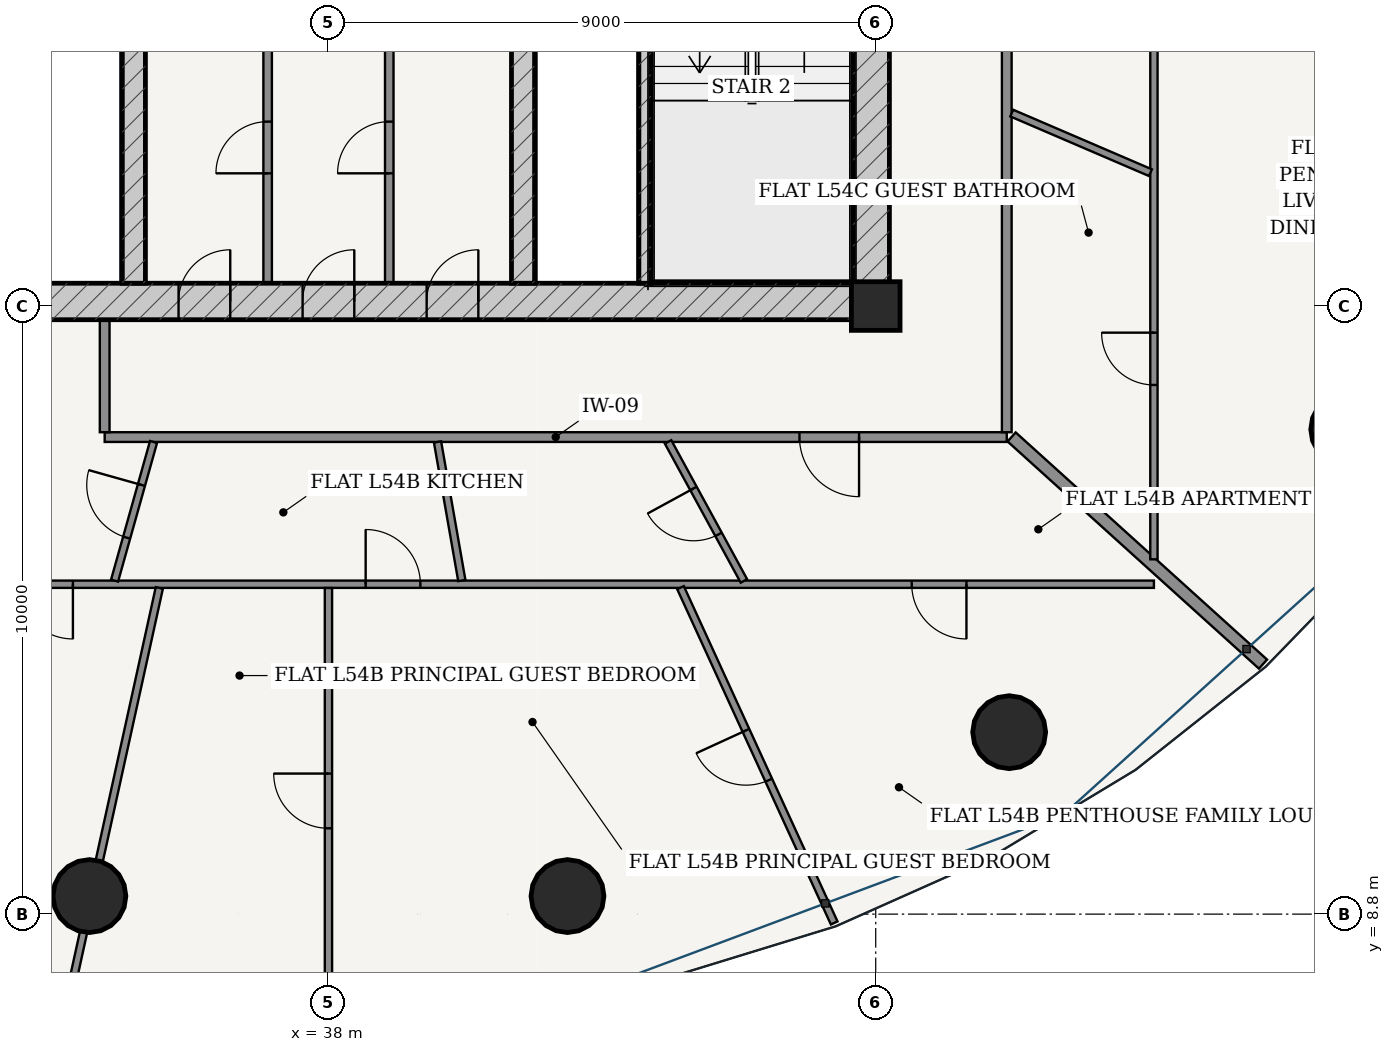
"""IFC4 building model, lengths in metres.
Left out: names, types, materials, properties, quantities, classifications, styles, units other than length and angle.
Written with IfcOpenShell. Run it as: python <this file> out.ifc"""

import sys

from ifc_helpers import new_model, si_unit, direction, frame, frame_2d, origin, origin_2d, place, context, subcontext, project, spatial, rectangle, hollow_circle, extrude, source, transform, mapped, element, fill, save


model = new_model("IFC4")
c1 = context("Model", 3, precision=1e-05, world=origin(), true_north=direction((-0.2419218956, 0.970295726276)))
c2 = subcontext(c1, "Body", "Model", "MODEL_VIEW")
j1 = project(units=[si_unit("LENGTHUNIT", "METRE"), si_unit("PLANEANGLEUNIT", "RADIAN")], contexts=[c1])
p1 = place(None, origin())
s1 = spatial("IfcSite", under=j1, at=p1, CompositionType="ELEMENT")
p2 = place(p1, origin())
s2 = spatial("IfcBuilding", under=s1, at=p2, CompositionType="ELEMENT")
p3 = place(p2, frame((0.0, 0.0, 206.0)))
s3 = spatial("IfcBuildingStorey", under=s2, at=p3, CompositionType="ELEMENT", Elevation=206.0)
p4 = place(p3, frame((47.0, 18.8, 0.0), z_axis=(0.0, 0.0, 1.0), x_axis=(1.0, 0.0, 0.0)))
e1 = element("IfcColumn", 1, at=p4, inside=s3, PredefinedType="COLUMN", context=c2, shape_type="SweptSolid", body=[
    extrude(rectangle(XDim=0.8, YDim=0.8, at=origin_2d()), origin(), (0.0, 0.0, 1.0), 3.7),
])
p5 = place(p3, frame((28.775, 18.875, 0.0), z_axis=(0.0, 0.0, 1.0), x_axis=(1.0, 0.0, 0.0)))
e2 = element("IfcWall", 2, at=p5, inside=s3, PredefinedType="SHEAR", context=c2, shape_type="SweptSolid", body=[
    extrude(rectangle(XDim=18.45, YDim=0.6, at=frame_2d((9.225, 0.0))), origin(), (0.0, 0.0, 1.0), 3.435),
])
p6 = place(p5, frame((6.76, 0.0, 0.0)))
e3 = element("IfcOpeningElement", 3, at=p6, cuts=e2, PredefinedType="OPENING", context=c2, shape_type="SweptSolid", body=[
    extrude(rectangle(XDim=0.85, YDim=2.1, at=frame_2d((0.425, 1.05))), frame((0.0, 0.31, 0.0), z_axis=(0.0, -1.0, 0.0), x_axis=(1.0, 0.0, 0.0)), (0.0, 0.0, 1.0), 0.62),
])
p7 = place(p5, frame((8.8, 0.0, 0.0)))
e4 = element("IfcOpeningElement", 4, at=p7, cuts=e2, PredefinedType="OPENING", context=c2, shape_type="SweptSolid", body=[
    extrude(rectangle(XDim=0.85, YDim=2.1, at=frame_2d((0.425, 1.05))), frame((0.0, 0.31, 0.0), z_axis=(0.0, -1.0, 0.0), x_axis=(1.0, 0.0, 0.0)), (0.0, 0.0, 1.0), 0.62),
])
p8 = place(p5, frame((10.84, 0.0, 0.0)))
e5 = element("IfcOpeningElement", 5, at=p8, cuts=e2, PredefinedType="OPENING", context=c2, shape_type="SweptSolid", body=[
    extrude(rectangle(XDim=0.85, YDim=2.1, at=frame_2d((0.425, 1.05))), frame((0.0, 0.31, 0.0), z_axis=(0.0, -1.0, 0.0), x_axis=(1.0, 0.0, 0.0)), (0.0, 0.0, 1.0), 0.62),
])
p9 = place(p3, frame((46.925, 19.175, 0.0), z_axis=(0.0, 0.0, 1.0), x_axis=(0.0, 1.0, 0.0)))
e6 = element("IfcWall", 6, at=p9, inside=s3, PredefinedType="SHEAR", context=c2, shape_type="SweptSolid", body=[
    extrude(rectangle(XDim=15.25, YDim=0.6, at=frame_2d((7.625, 0.0))), origin(), (0.0, 0.0, 1.0), 3.435),
])
p10 = place(p9, frame((9.875, 0.0, 0.0)))
e7 = element("IfcOpeningElement", 7, at=p10, cuts=e6, PredefinedType="OPENING", context=c2, shape_type="SweptSolid", body=[
    extrude(rectangle(XDim=1.5, YDim=2.2, at=frame_2d((0.75, 1.1))), frame((0.0, 0.31, 0.0), z_axis=(0.0, -1.0, 0.0), x_axis=(1.0, 0.0, 0.0)), (0.0, 0.0, 1.0), 0.62),
])
p11 = place(p3, frame((43.205, 19.175, 0.0), z_axis=(0.0, 0.0, 1.0), x_axis=(0.0, 1.0, 0.0)))
e8 = element("IfcWall", 8, at=p11, inside=s3, PredefinedType="SOLIDWALL", context=c2, shape_type="SweptSolid", body=[
    extrude(rectangle(XDim=7.375, YDim=0.2, at=frame_2d((3.688, 0.0))), origin(), (0.0, 0.0, 1.0), 3.435),
])
p12 = place(p3, frame((34.8, 19.175, 0.0), z_axis=(0.0, 0.0, 1.0), x_axis=(0.0, 1.0, 0.0)))
e9 = element("IfcWall", 9, at=p12, inside=s3, PredefinedType="SHEAR", context=c2, shape_type="SweptSolid", body=[
    extrude(rectangle(XDim=15.25, YDim=0.38, at=frame_2d((7.625, 0.0))), origin(), (0.0, 0.0, 1.0), 3.435),
])
p13 = place(p12, frame((7.8, 0.0, 0.0)))
e10 = element("IfcOpeningElement", 10, at=p13, cuts=e9, PredefinedType="OPENING", context=c2, shape_type="SweptSolid", body=[
    extrude(rectangle(XDim=1.05, YDim=2.15, at=frame_2d((0.525, 1.075))), frame((0.0, 0.2, 0.0), z_axis=(0.0, -1.0, 0.0), x_axis=(1.0, 0.0, 0.0)), (0.0, 0.0, 1.0), 0.4),
])
p14 = place(p3, frame((41.2, 19.175, 0.0), z_axis=(0.0, 0.0, 1.0), x_axis=(0.0, 1.0, 0.0)))
e11 = element("IfcWall", 11, at=p14, inside=s3, PredefinedType="SHEAR", context=c2, shape_type="SweptSolid", body=[
    extrude(rectangle(XDim=15.25, YDim=0.38, at=frame_2d((7.625, 0.0))), origin(), (0.0, 0.0, 1.0), 3.435),
])
p15 = place(p14, frame((7.8, 0.0, 0.0)))
e12 = element("IfcOpeningElement", 12, at=p15, cuts=e11, PredefinedType="OPENING", context=c2, shape_type="SweptSolid", body=[
    extrude(rectangle(XDim=1.05, YDim=2.15, at=frame_2d((0.525, 1.075))), frame((0.0, 0.2, 0.0), z_axis=(0.0, -1.0, 0.0), x_axis=(1.0, 0.0, 0.0)), (0.0, 0.0, 1.0), 0.4),
])
for number, where, z_axis, x_axis in (
    (13, (34.069, 9.097, 0.0), (0.0, 0.0, 1.0), (1.0, 0.0, 0.0)),
    (14, (41.931, 9.097, 0.0), (0.0, 0.0, 1.0), (1.0, 0.0, 0.0)),
    (15, (49.195, 11.792, 0.0), (0.0, 0.0, 1.0), (1.0, 0.0, 0.0)),
    (16, (54.754, 16.772, 0.0), (0.0, 0.0, 1.0), (1.0, 0.0, 0.0)),
):
    element("IfcColumn", number, at=place(p3, frame(where, z_axis=z_axis, x_axis=x_axis)), inside=s3, PredefinedType="COLUMN", context=c2, shape_type="SweptSolid", body=[
        extrude(hollow_circle(Radius=0.6, WallThickness=0.038, at=origin_2d()), origin(), (0.0, 0.0, 1.0), 3.7),
    ])
p16 = place(p3, frame((25.83, 10.473, 0.0), z_axis=(0.0, 0.0, 1.0), x_axis=(0.936556918375, -0.350515532672, 0.0)))
e17 = element("IfcWall", 17, at=p16, inside=s3, PredefinedType="SOLIDWALL", context=c2, shape_type="SweptSolid", body=[
    extrude(rectangle(XDim=8.539, YDim=0.26, at=frame_2d((4.27, 0.0))), origin(), (0.0, 0.0, 1.0), 3.435),
])
p17 = place(p16, frame((3.594, 0.0, 0.0)))
e18 = element("IfcOpeningElement", 18, at=p17, cuts=e17, PredefinedType="OPENING", context=c2, shape_type="SweptSolid", body=[
    extrude(rectangle(XDim=1.35, YDim=2.2, at=frame_2d((0.675, 1.1))), frame((0.0, 0.14, 0.0), z_axis=(0.0, -1.0, 0.0), x_axis=(1.0, 0.0, 0.0)), (0.0, 0.0, 1.0), 0.28),
])
p18 = place(p3, frame((37.0, 19.175, 0.0), z_axis=(0.0, 0.0, 1.0), x_axis=(0.0, 1.0, 0.0)))
e19 = element("IfcWall", 19, at=p18, inside=s3, PredefinedType="PARTITIONING", context=c2, shape_type="SweptSolid", body=[
    extrude(rectangle(XDim=4.465, YDim=0.14, at=frame_2d((2.232, 0.0))), origin(), (0.0, 0.0, 1.0), 3.435),
])
p19 = place(p18, frame((1.808, 0.0, 0.0)))
e20 = element("IfcOpeningElement", 20, at=p19, cuts=e19, PredefinedType="OPENING", context=c2, shape_type="SweptSolid", body=[
    extrude(rectangle(XDim=0.85, YDim=2.1, at=frame_2d((0.425, 1.05))), frame((0.0, 0.08, 0.0), z_axis=(0.0, -1.0, 0.0), x_axis=(1.0, 0.0, 0.0)), (0.0, 0.0, 1.0), 0.16),
])
p20 = place(p3, frame((39.0, 19.175, 0.0), z_axis=(0.0, 0.0, 1.0), x_axis=(0.0, 1.0, 0.0)))
e21 = element("IfcWall", 21, at=p20, inside=s3, PredefinedType="PARTITIONING", context=c2, shape_type="SweptSolid", body=[
    extrude(rectangle(XDim=4.465, YDim=0.14, at=frame_2d((2.232, 0.0))), origin(), (0.0, 0.0, 1.0), 3.435),
])
p21 = place(p20, frame((1.808, 0.0, 0.0)))
e22 = element("IfcOpeningElement", 22, at=p21, cuts=e21, PredefinedType="OPENING", context=c2, shape_type="SweptSolid", body=[
    extrude(rectangle(XDim=0.85, YDim=2.1, at=frame_2d((0.425, 1.05))), frame((0.0, 0.08, 0.0), z_axis=(0.0, -1.0, 0.0), x_axis=(1.0, 0.0, 0.0)), (0.0, 0.0, 1.0), 0.16),
])
p22 = place(p3, frame((34.32, 16.645, 0.0), z_axis=(0.0, 0.0, 1.0), x_axis=(1.0, 0.0, 0.0)))
e23 = element("IfcWall", 23, at=p22, inside=s3, PredefinedType="PARTITIONING", context=c2, shape_type="SweptSolid", body=[
    extrude(rectangle(XDim=14.835, YDim=0.16, at=frame_2d((7.417, 0.0))), origin(), (0.0, 0.0, 1.0), 2.951),
])
p23 = place(p22, frame((11.426, 0.0, 0.0)))
e24 = element("IfcOpeningElement", 24, at=p23, cuts=e23, PredefinedType="OPENING", context=c2, shape_type="SweptSolid", body=[
    extrude(rectangle(XDim=0.98, YDim=2.2, at=frame_2d((0.49, 1.1))), frame((0.0, 0.09, 0.0), z_axis=(0.0, -1.0, 0.0), x_axis=(1.0, 0.0, 0.0)), (0.0, 0.0, 1.0), 0.18),
])
p24 = place(p3, frame((34.32, 16.725, 0.0), z_axis=(0.0, 0.0, 1.0), x_axis=(0.0, 1.0, 0.0)))
e25 = element("IfcWall", 25, at=p24, inside=s3, PredefinedType="PARTITIONING", context=c2, shape_type="SweptSolid", body=[
    extrude(rectangle(XDim=1.85, YDim=0.16, at=frame_2d((0.925, 0.0))), origin(), (0.0, 0.0, 1.0), 3.435),
])
p25 = place(p3, frame((49.155, 16.725, 0.0), z_axis=(0.0, 0.0, 1.0), x_axis=(0.0, 1.0, 0.0)))
e26 = element("IfcWall", 26, at=p25, inside=s3, PredefinedType="PARTITIONING", context=c2, shape_type="SweptSolid", body=[
    extrude(rectangle(XDim=18.3, YDim=0.16, at=frame_2d((9.15, 0.0))), origin(), (0.0, 0.0, 1.0), 2.951),
])
p26 = place(p25, frame((15.302, 0.0, 0.0)))
e27 = element("IfcOpeningElement", 27, at=p26, cuts=e26, PredefinedType="OPENING", context=c2, shape_type="SweptSolid", body=[
    extrude(rectangle(XDim=0.98, YDim=2.2, at=frame_2d((0.49, 1.1))), frame((0.0, 0.09, 0.0), z_axis=(0.0, -1.0, 0.0), x_axis=(1.0, 0.0, 0.0)), (0.0, 0.0, 1.0), 0.18),
])
p27 = place(p3, frame((51.575, 14.225, 0.0), z_axis=(0.0, 0.0, 1.0), x_axis=(-1.0, 0.0, 0.0)))
e28 = element("IfcWall", 28, at=p27, inside=s3, PredefinedType="PARTITIONING", context=c2, shape_type="SweptSolid", body=[
    extrude(rectangle(XDim=19.675, YDim=0.12, at=frame_2d((9.837, 0.0))), origin(), (0.0, 0.0, 1.0), 2.951),
])
p28 = place(p27, frame((3.083, 0.0, 0.0)))
e29 = element("IfcOpeningElement", 29, at=p28, cuts=e28, PredefinedType="OPENING", context=c2, shape_type="SweptSolid", body=[
    extrude(rectangle(XDim=0.9, YDim=2.15, at=frame_2d((0.45, 1.075))), frame((0.0, 0.07, 0.0), z_axis=(0.0, -1.0, 0.0), x_axis=(1.0, 0.0, 0.0)), (0.0, 0.0, 1.0), 0.14),
])
p29 = place(p27, frame((12.063, 0.0, 0.0)))
e30 = element("IfcOpeningElement", 30, at=p29, cuts=e28, PredefinedType="OPENING", context=c2, shape_type="SweptSolid", body=[
    extrude(rectangle(XDim=0.9, YDim=2.15, at=frame_2d((0.45, 1.075))), frame((0.0, 0.07, 0.0), z_axis=(0.0, -1.0, 0.0), x_axis=(1.0, 0.0, 0.0)), (0.0, 0.0, 1.0), 0.14),
])
p30 = place(p27, frame((17.777, 0.0, 0.0)))
e31 = element("IfcOpeningElement", 31, at=p30, cuts=e28, PredefinedType="OPENING", context=c2, shape_type="SweptSolid", body=[
    extrude(rectangle(XDim=0.9, YDim=2.15, at=frame_2d((0.45, 1.075))), frame((0.0, 0.07, 0.0), z_axis=(0.0, -1.0, 0.0), x_axis=(1.0, 0.0, 0.0)), (0.0, 0.0, 1.0), 0.14),
])
p31 = place(p3, frame((35.219, 14.165, 0.0), z_axis=(0.0, 0.0, 1.0), x_axis=(-0.214959845337, -0.976622887758, 0.0)))
e32 = element("IfcWall", 32, at=p31, inside=s3, PredefinedType="PARTITIONING", context=c2, shape_type="SweptSolid", body=[
    extrude(rectangle(XDim=6.744, YDim=0.12, at=frame_2d((3.372, 0.0))), origin(), (0.0, 0.0, 1.0), 2.951),
])
p32 = place(p3, frame((38.0, 14.163, 0.0), z_axis=(0.0, 0.0, 1.0), x_axis=(0.0, -1.0, 0.0)))
e33 = element("IfcWall", 33, at=p32, inside=s3, PredefinedType="PARTITIONING", context=c2, shape_type="SweptSolid", body=[
    extrude(rectangle(XDim=7.003, YDim=0.12, at=frame_2d((3.501, 0.0))), origin(), (0.0, 0.0, 1.0), 2.951),
])
p33 = place(p32, frame((3.052, 0.0, 0.0)))
e34 = element("IfcOpeningElement", 34, at=p33, cuts=e33, PredefinedType="OPENING", context=c2, shape_type="SweptSolid", body=[
    extrude(rectangle(XDim=0.9, YDim=2.15, at=frame_2d((0.45, 1.075))), frame((0.0, 0.07, 0.0), z_axis=(0.0, -1.0, 0.0), x_axis=(1.0, 0.0, 0.0)), (0.0, 0.0, 1.0), 0.14),
])
p34 = place(p3, frame((43.79, 14.169, 0.0), z_axis=(0.0, 0.0, 1.0), x_axis=(0.416687974363, -0.909049576218, 0.0)))
e35 = element("IfcWall", 35, at=p34, inside=s3, PredefinedType="PARTITIONING", context=c2, shape_type="SweptSolid", body=[
    extrude(rectangle(XDim=6.065, YDim=0.12, at=frame_2d((3.033, 0.0))), origin(), (0.0, 0.0, 1.0), 2.951),
])
p35 = place(p34, frame((2.583, 0.0, 0.0)))
e36 = element("IfcOpeningElement", 36, at=p35, cuts=e35, PredefinedType="OPENING", context=c2, shape_type="SweptSolid", body=[
    extrude(rectangle(XDim=0.9, YDim=2.15, at=frame_2d((0.45, 1.075))), frame((0.0, 0.07, 0.0), z_axis=(0.0, -1.0, 0.0), x_axis=(1.0, 0.0, 0.0)), (0.0, 0.0, 1.0), 0.14),
])
p36 = place(p3, frame((35.124, 16.565, 0.0), z_axis=(0.0, 0.0, 1.0), x_axis=(-0.270566477163, -0.962701293982, 0.0)))
e37 = element("IfcWall", 37, at=p36, inside=s3, PredefinedType="PARTITIONING", context=c2, shape_type="SweptSolid", body=[
    extrude(rectangle(XDim=2.369, YDim=0.12, at=frame_2d((1.184, 0.0))), origin(), (0.0, 0.0, 1.0), 3.435),
])
p37 = place(p36, frame((0.734, 0.0, 0.0)))
e38 = element("IfcOpeningElement", 38, at=p37, cuts=e37, PredefinedType="OPENING", context=c2, shape_type="SweptSolid", body=[
    extrude(rectangle(XDim=0.9, YDim=2.15, at=frame_2d((0.45, 1.075))), frame((0.0, 0.07, 0.0), z_axis=(0.0, -1.0, 0.0), x_axis=(1.0, 0.0, 0.0)), (0.0, 0.0, 1.0), 0.14),
])
p38 = place(p3, frame((39.794, 16.565, 0.0), z_axis=(0.0, 0.0, 1.0), x_axis=(0.172641422295, -0.984984740647, 0.0)))
e39 = element("IfcWall", 39, at=p38, inside=s3, PredefinedType="PARTITIONING", context=c2, shape_type="SweptSolid", body=[
    extrude(rectangle(XDim=2.313, YDim=0.12, at=frame_2d((1.157, 0.0))), origin(), (0.0, 0.0, 1.0), 3.435),
])
p39 = place(p3, frame((43.585, 16.565, 0.0), z_axis=(0.0, 0.0, 1.0), x_axis=(0.479068920965, -0.877777288932, 0.0)))
e40 = element("IfcWall", 40, at=p39, inside=s3, PredefinedType="PARTITIONING", context=c2, shape_type="SweptSolid", body=[
    extrude(rectangle(XDim=2.604, YDim=0.12, at=frame_2d((1.302, 0.0))), origin(), (0.0, 0.0, 1.0), 3.11),
])
p40 = place(p39, frame((0.872, 0.0, 0.0)))
e41 = element("IfcOpeningElement", 41, at=p40, cuts=e40, PredefinedType="OPENING", context=c2, shape_type="SweptSolid", body=[
    extrude(rectangle(XDim=0.86, YDim=2.15, at=frame_2d((0.43, 1.075))), frame((0.0, 0.07, 0.0), z_axis=(0.0, -1.0, 0.0), x_axis=(1.0, 0.0, 0.0)), (0.0, 0.0, 1.0), 0.14),
])
p41 = place(p3, frame((49.235, 16.647, 0.0), z_axis=(0.0, 0.0, 1.0), x_axis=(0.741935290449, -0.670471494387, 0.0)))
e42 = element("IfcWall", 42, at=p41, inside=s3, PredefinedType="PARTITIONING", context=c2, shape_type="SweptSolid", body=[
    extrude(rectangle(XDim=5.572, YDim=0.2, at=frame_2d((2.786, 0.0))), origin(), (0.0, 0.0, 1.0), 2.951),
])
p42 = place(p3, frame((51.575, 37.525, 0.0), z_axis=(0.0, 0.0, 1.0), x_axis=(0.0, -1.0, 0.0)))
e43 = element("IfcWall", 43, at=p42, inside=s3, PredefinedType="PARTITIONING", context=c2, shape_type="SweptSolid", body=[
    extrude(rectangle(XDim=22.89, YDim=0.12, at=frame_2d((11.445, 0.0))), origin(), (0.0, 0.0, 1.0), 2.951),
])
p43 = place(p42, frame((4.102, 0.0, 0.0)))
e44 = element("IfcOpeningElement", 44, at=p43, cuts=e43, PredefinedType="OPENING", context=c2, shape_type="SweptSolid", body=[
    extrude(rectangle(XDim=0.9, YDim=2.15, at=frame_2d((0.45, 1.075))), frame((0.0, 0.07, 0.0), z_axis=(0.0, -1.0, 0.0), x_axis=(1.0, 0.0, 0.0)), (0.0, 0.0, 1.0), 0.14),
])
p44 = place(p42, frame((19.163, 0.0, 0.0)))
e45 = element("IfcOpeningElement", 45, at=p44, cuts=e43, PredefinedType="OPENING", context=c2, shape_type="SweptSolid", body=[
    extrude(rectangle(XDim=0.86, YDim=2.15, at=frame_2d((0.43, 1.075))), frame((0.0, 0.07, 0.0), z_axis=(0.0, -1.0, 0.0), x_axis=(1.0, 0.0, 0.0)), (0.0, 0.0, 1.0), 0.14),
])
p45 = place(p42, frame((13.046, 0.0, 0.0)))
e46 = element("IfcOpeningElement", 46, at=p45, cuts=e43, PredefinedType="OPENING", context=c2, shape_type="SweptSolid", body=[
    extrude(rectangle(XDim=0.9, YDim=2.15, at=frame_2d((0.45, 1.075))), frame((0.0, 0.07, 0.0), z_axis=(0.0, -1.0, 0.0), x_axis=(1.0, 0.0, 0.0)), (0.0, 0.0, 1.0), 0.14),
])
p46 = place(p3, frame((49.237, 21.973, 0.0), z_axis=(0.0, 0.0, 1.0), x_axis=(0.91880901308, -0.394702416364, 0.0)))
e47 = element("IfcWall", 47, at=p46, inside=s3, PredefinedType="PARTITIONING", context=c2, shape_type="SweptSolid", body=[
    extrude(rectangle(XDim=2.483, YDim=0.12, at=frame_2d((1.241, 0.0))), origin(), (0.0, 0.0, 1.0), 3.11),
])
m1 = source(origin(), c2, "Body", "SweptSolid", [
    extrude(rectangle(XDim=0.85, YDim=2.1, at=frame_2d((0.425, 1.05))), frame((0.0, 0.025, 0.0), z_axis=(0.0, -1.0, 0.0), x_axis=(1.0, 0.0, 0.0)), (0.0, 0.0, 1.0), 0.05),
])
p47 = place(p6, origin())
e48 = element("IfcDoor", 48, at=p47, inside=s3, OperationType="SINGLE_SWING_RIGHT", PredefinedType="DOOR", context=c2, shape_type="MappedRepresentation", body=[
    mapped(m1, transform((0.0, 0.0, 0.0), scale=1.0)),
])
fill(e3, e48)
p48 = place(p7, origin())
e49 = element("IfcDoor", 49, at=p48, inside=s3, OperationType="SINGLE_SWING_RIGHT", PredefinedType="DOOR", context=c2, shape_type="MappedRepresentation", body=[
    mapped(m1, transform((0.0, 0.0, 0.0), scale=1.0)),
])
fill(e4, e49)
p49 = place(p8, origin())
e50 = element("IfcDoor", 50, at=p49, inside=s3, OperationType="SINGLE_SWING_RIGHT", PredefinedType="DOOR", context=c2, shape_type="MappedRepresentation", body=[
    mapped(m1, transform((0.0, 0.0, 0.0), scale=1.0)),
])
fill(e5, e50)
p50 = place(p19, origin())
e51 = element("IfcDoor", 51, at=p50, inside=s3, OperationType="SINGLE_SWING_LEFT", PredefinedType="DOOR", context=c2, shape_type="MappedRepresentation", body=[
    mapped(m1, transform((0.0, 0.0, 0.0), scale=1.0)),
])
fill(e20, e51)
p51 = place(p21, origin())
e52 = element("IfcDoor", 52, at=p51, inside=s3, OperationType="SINGLE_SWING_LEFT", PredefinedType="DOOR", context=c2, shape_type="MappedRepresentation", body=[
    mapped(m1, transform((0.0, 0.0, 0.0), scale=1.0)),
])
fill(e22, e52)
m2 = source(origin(), c2, "Body", "SweptSolid", [
    extrude(rectangle(XDim=0.98, YDim=2.2, at=frame_2d((0.49, 1.1))), frame((0.0, 0.025, 0.0), z_axis=(0.0, -1.0, 0.0), x_axis=(1.0, 0.0, 0.0)), (0.0, 0.0, 1.0), 0.05),
])
p52 = place(p23, frame((0.98, 0.0, 0.0), z_axis=(0.0, 0.0, 1.0), x_axis=(-1.0, 0.0, 0.0)))
e53 = element("IfcDoor", 53, at=p52, inside=s3, OperationType="SINGLE_SWING_LEFT", PredefinedType="DOOR", context=c2, shape_type="MappedRepresentation", body=[
    mapped(m2, transform((0.0, 0.0, 0.0), scale=1.0)),
])
fill(e24, e53)
m3 = source(origin(), c2, "Body", "SweptSolid", [
    extrude(rectangle(XDim=0.86, YDim=2.15, at=frame_2d((0.43, 1.075))), frame((0.0, 0.025, 0.0), z_axis=(0.0, -1.0, 0.0), x_axis=(1.0, 0.0, 0.0)), (0.0, 0.0, 1.0), 0.05),
])
p53 = place(p40, frame((0.86, 0.0, 0.0), z_axis=(0.0, 0.0, 1.0), x_axis=(-1.0, 0.0, 0.0)))
e54 = element("IfcDoor", 54, at=p53, inside=s3, OperationType="SINGLE_SWING_RIGHT", PredefinedType="DOOR", context=c2, shape_type="MappedRepresentation", body=[
    mapped(m3, transform((0.0, 0.0, 0.0), scale=1.0)),
])
fill(e41, e54)
m4 = source(origin(), c2, "Body", "SweptSolid", [
    extrude(rectangle(XDim=0.9, YDim=2.15, at=frame_2d((0.45, 1.075))), frame((0.0, 0.025, 0.0), z_axis=(0.0, -1.0, 0.0), x_axis=(1.0, 0.0, 0.0)), (0.0, 0.0, 1.0), 0.05),
])
p54 = place(p28, origin())
e55 = element("IfcDoor", 55, at=p54, inside=s3, OperationType="SINGLE_SWING_LEFT", PredefinedType="DOOR", context=c2, shape_type="MappedRepresentation", body=[
    mapped(m4, transform((0.0, 0.0, 0.0), scale=1.0)),
])
fill(e29, e55)
p55 = place(p35, frame((0.9, 0.0, 0.0), z_axis=(0.0, 0.0, 1.0), x_axis=(-1.0, 0.0, 0.0)))
e56 = element("IfcDoor", 56, at=p55, inside=s3, OperationType="SINGLE_SWING_RIGHT", PredefinedType="DOOR", context=c2, shape_type="MappedRepresentation", body=[
    mapped(m4, transform((0.0, 0.0, 0.0), scale=1.0)),
])
fill(e36, e56)
p56 = place(p29, frame((0.9, 0.0, 0.0), z_axis=(0.0, 0.0, 1.0), x_axis=(-1.0, 0.0, 0.0)))
e57 = element("IfcDoor", 57, at=p56, inside=s3, OperationType="SINGLE_SWING_LEFT", PredefinedType="DOOR", context=c2, shape_type="MappedRepresentation", body=[
    mapped(m4, transform((0.0, 0.0, 0.0), scale=1.0)),
])
fill(e30, e57)
p57 = place(p37, frame((0.9, 0.0, 0.0), z_axis=(0.0, 0.0, 1.0), x_axis=(-1.0, 0.0, 0.0)))
e58 = element("IfcDoor", 58, at=p57, inside=s3, OperationType="SINGLE_SWING_RIGHT", PredefinedType="DOOR", context=c2, shape_type="MappedRepresentation", body=[
    mapped(m4, transform((0.0, 0.0, 0.0), scale=1.0)),
])
fill(e38, e58)
p58 = place(p30, origin())
e59 = element("IfcDoor", 59, at=p58, inside=s3, OperationType="SINGLE_SWING_LEFT", PredefinedType="DOOR", context=c2, shape_type="MappedRepresentation", body=[
    mapped(m4, transform((0.0, 0.0, 0.0), scale=1.0)),
])
fill(e31, e59)
p59 = place(p33, frame((0.9, 0.0, 0.0), z_axis=(0.0, 0.0, 1.0), x_axis=(-1.0, 0.0, 0.0)))
e60 = element("IfcDoor", 60, at=p59, inside=s3, OperationType="SINGLE_SWING_RIGHT", PredefinedType="DOOR", context=c2, shape_type="MappedRepresentation", body=[
    mapped(m4, transform((0.0, 0.0, 0.0), scale=1.0)),
])
fill(e34, e60)
p60 = place(p44, frame((0.86, 0.0, 0.0), z_axis=(0.0, 0.0, 1.0), x_axis=(-1.0, 0.0, 0.0)))
e61 = element("IfcDoor", 61, at=p60, inside=s3, OperationType="SINGLE_SWING_RIGHT", PredefinedType="DOOR", context=c2, shape_type="MappedRepresentation", body=[
    mapped(m3, transform((0.0, 0.0, 0.0), scale=1.0)),
])
fill(e45, e61)
save(model, sys.argv[1])
